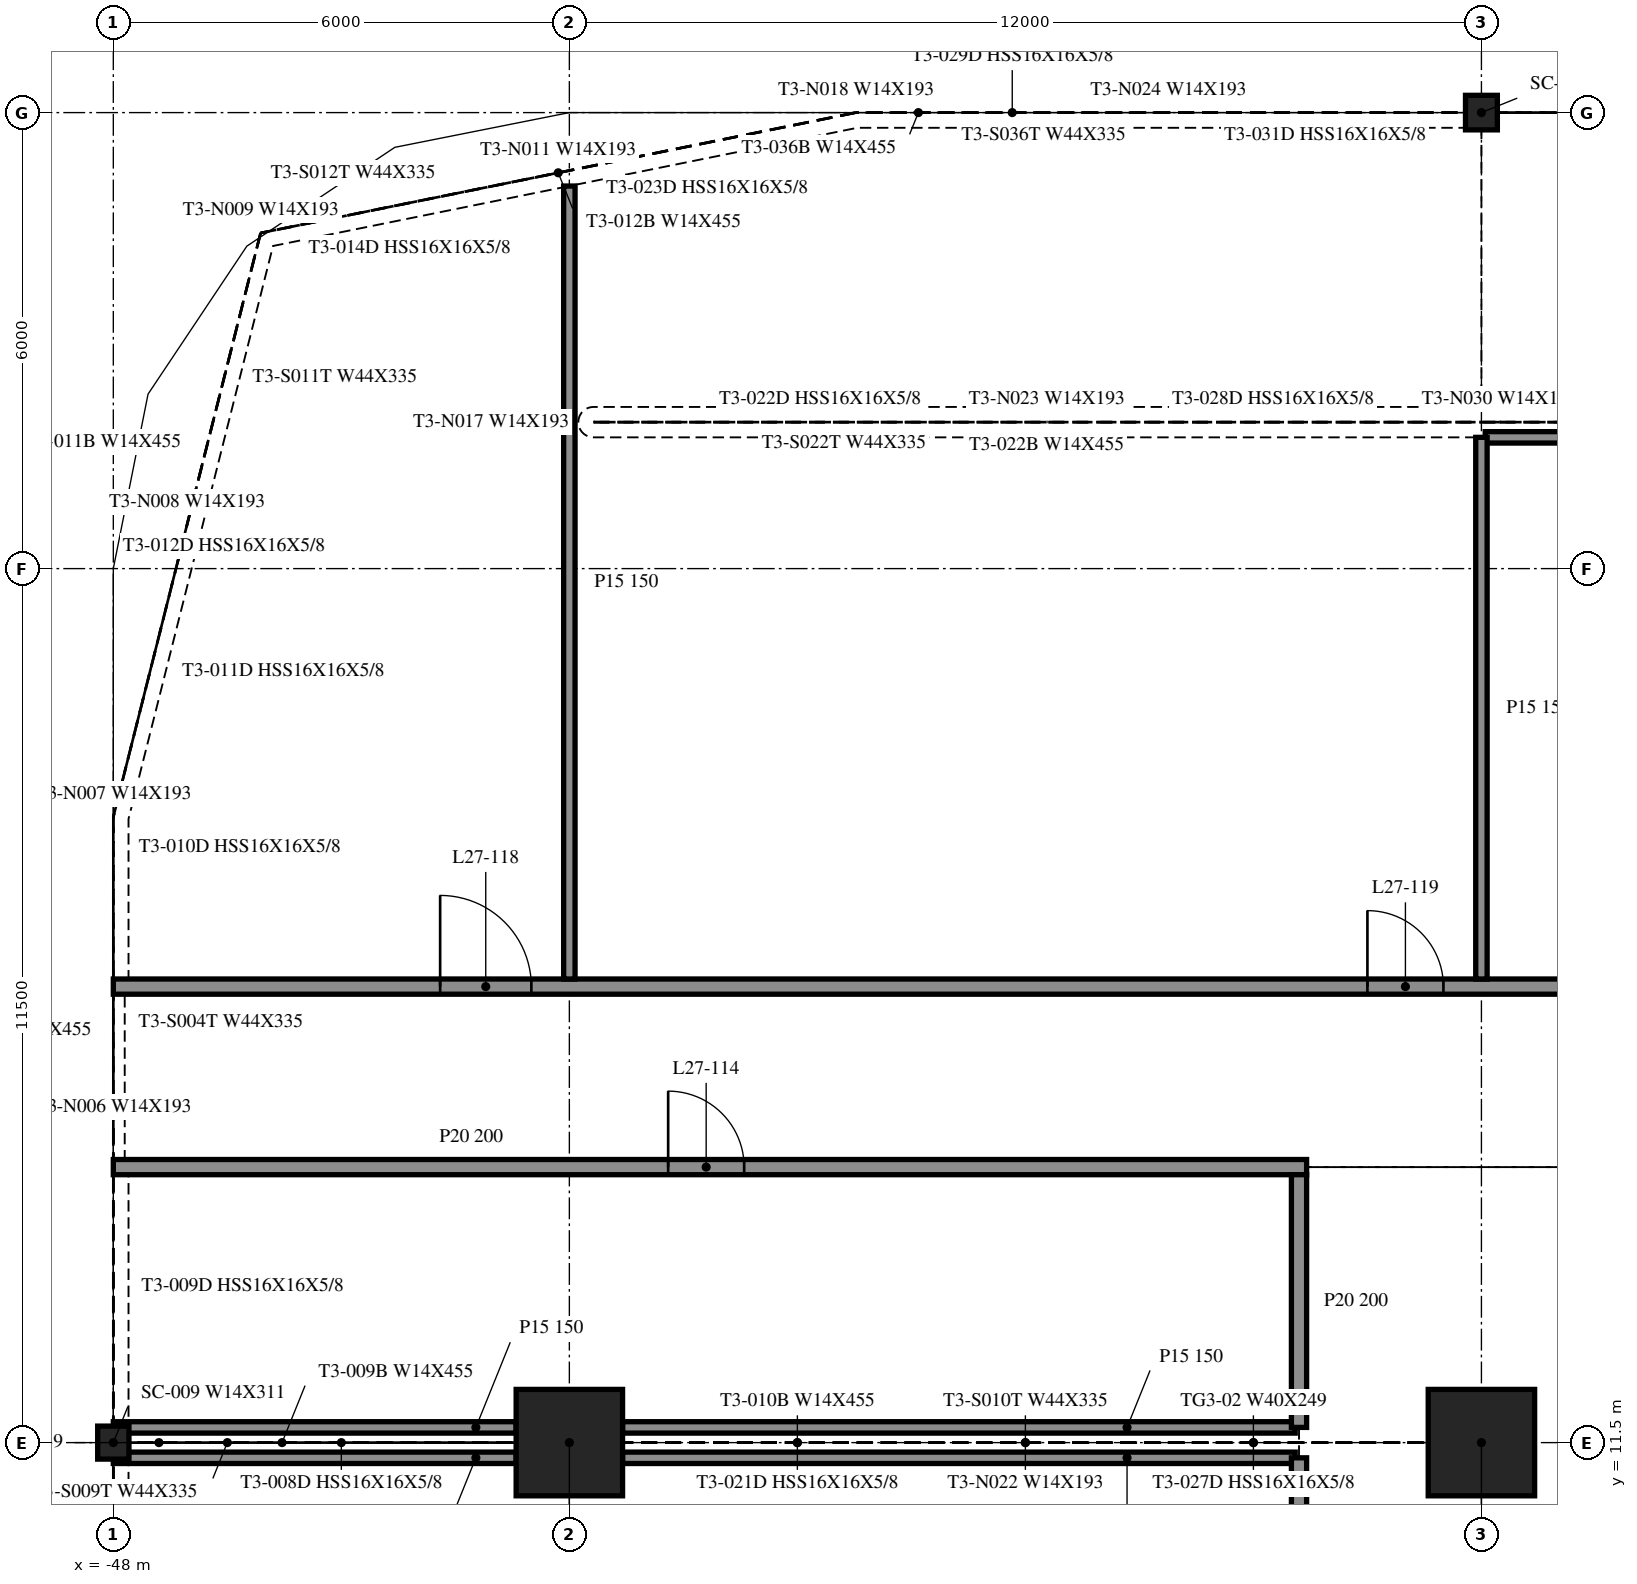
"""IFC4 building model, lengths in metres.
Left out: names, types, materials, properties, quantities, classifications, styles, units other than length and angle.
Written with IfcOpenShell. Run it as: python <this file> out.ifc"""

import sys

from ifc_helpers import new_model, si_unit, direction, frame, frame_2d, origin, origin_2d, place, context, subcontext, project, spatial, rectangle, i_section, extrude, element, fill, save


model = new_model("IFC4")
c1 = context("Model", 3, precision=1e-05, world=origin(), true_north=direction((0.0, 1.0)))
c2 = subcontext(c1, "Body", "Model", "MODEL_VIEW")
j1 = project(units=[si_unit("LENGTHUNIT", "METRE"), si_unit("PLANEANGLEUNIT", "RADIAN")], contexts=[c1])
p1 = place(None, origin())
s1 = spatial("IfcSite", under=j1, at=p1, CompositionType="ELEMENT")
p2 = place(p1, origin())
s2 = spatial("IfcBuilding", under=s1, at=p2, CompositionType="ELEMENT")
p3 = place(p2, frame((0.0, 0.0, 117.6)))
s3 = spatial("IfcBuildingStorey", under=s2, at=p3, CompositionType="ELEMENT", Elevation=117.6)
for number, where, z_axis, x_axis in (
    (1, (-42.0, 11.5, -0.55), (0.0, 0.0, 1.0), (1.0, 0.0, 0.0)),
    (2, (-30.0, 11.5, -0.55), (0.0, 0.0, 1.0), (1.0, 0.0, 0.0)),
):
    element("IfcColumn", number, at=place(p3, frame(where, z_axis=z_axis, x_axis=x_axis)), inside=s3, PredefinedType="COLUMN", context=c2, shape_type="SweptSolid", body=[
        extrude(rectangle(XDim=1.4, YDim=1.4, at=origin_2d()), origin(), (0.0, 0.0, 1.0), 4.61),
    ])
p4 = place(p3, frame((-30.0, 29.0, -0.55), z_axis=(0.0, 0.0, 1.0), x_axis=(1.0, 0.0, 0.0)))
e3 = element("IfcColumn", 3, at=p4, inside=s3, PredefinedType="COLUMN", context=c2, shape_type="SweptSolid", body=[
    extrude(i_section(OverallWidth=0.419, OverallDepth=0.455, WebThickness=0.042, FlangeThickness=0.068, at=origin_2d()), origin(), (0.0, 0.0, 1.0), 4.61),
])
p5 = place(p3, frame((-48.0, 11.5, -0.55), z_axis=(0.0, 0.0, 1.0), x_axis=(1.0, 0.0, 0.0)))
e4 = element("IfcColumn", 4, at=p5, inside=s3, PredefinedType="COLUMN", context=c2, shape_type="SweptSolid", body=[
    extrude(i_section(OverallWidth=0.412, OverallDepth=0.434, WebThickness=0.036, FlangeThickness=0.057, at=origin_2d()), origin(), (0.0, 0.0, 1.0), 4.61),
])
p6 = place(p3, frame((-48.0, 11.3, 0.0), z_axis=(0.0, 0.0, 1.0), x_axis=(1.0, 0.0, 0.0)))
e5 = element("IfcWall", 5, at=p6, inside=s3, PredefinedType="PARTITIONING", context=c2, shape_type="SweptSolid", body=[
    extrude(rectangle(XDim=5.3, YDim=0.15, at=frame_2d((2.65, 0.0))), origin(), (0.0, 0.0, 1.0), 4.06),
])
p7 = place(p3, frame((-41.3, 11.3, 0.0), z_axis=(0.0, 0.0, 1.0), x_axis=(1.0, 0.0, 0.0)))
e6 = element("IfcWall", 6, at=p7, inside=s3, PredefinedType="PARTITIONING", context=c2, shape_type="SweptSolid", body=[
    extrude(rectangle(XDim=8.85, YDim=0.15, at=frame_2d((4.425, 0.0))), origin(), (0.0, 0.0, 1.0), 4.06),
])
p8 = place(p3, frame((-48.0, 11.7, 0.0), z_axis=(0.0, 0.0, 1.0), x_axis=(1.0, 0.0, 0.0)))
e7 = element("IfcWall", 7, at=p8, inside=s3, PredefinedType="PARTITIONING", context=c2, shape_type="SweptSolid", body=[
    extrude(rectangle(XDim=5.3, YDim=0.15, at=frame_2d((2.65, 0.0))), origin(), (0.0, 0.0, 1.0), 4.06),
])
p9 = place(p3, frame((-41.3, 11.7, 0.0), z_axis=(0.0, 0.0, 1.0), x_axis=(1.0, 0.0, 0.0)))
e8 = element("IfcWall", 8, at=p9, inside=s3, PredefinedType="PARTITIONING", context=c2, shape_type="SweptSolid", body=[
    extrude(rectangle(XDim=8.85, YDim=0.15, at=frame_2d((4.425, 0.0))), origin(), (0.0, 0.0, 1.0), 4.06),
])
p10 = place(p3, frame((-48.0, 15.125, 0.0), z_axis=(0.0, 0.0, 1.0), x_axis=(1.0, 0.0, 0.0)))
e9 = element("IfcWall", 9, at=p10, inside=s3, PredefinedType="PARTITIONING", context=c2, shape_type="SweptSolid", body=[
    extrude(rectangle(XDim=15.7, YDim=0.2, at=frame_2d((7.85, 0.0))), origin(), (0.0, 0.0, 1.0), 4.06),
])
p11 = place(p10, frame((7.3, 0.0, 0.0)))
e10 = element("IfcOpeningElement", 10, at=p11, cuts=e9, PredefinedType="OPENING", context=c2, shape_type="SweptSolid", body=[
    extrude(rectangle(XDim=1.0, YDim=2.1, at=frame_2d((0.5, 1.05))), frame((0.0, 0.11, 0.0), z_axis=(0.0, -1.0, 0.0), x_axis=(1.0, 0.0, 0.0)), (0.0, 0.0, 1.0), 0.22),
])
p12 = place(p3, frame((-48.0, 17.5, 0.0), z_axis=(0.0, 0.0, 1.0), x_axis=(1.0, 0.0, 0.0)))
e11 = element("IfcWall", 11, at=p12, inside=s3, PredefinedType="PARTITIONING", context=c2, shape_type="SweptSolid", body=[
    extrude(rectangle(XDim=95.8, YDim=0.2, at=frame_2d((47.9, 0.0))), origin(), (0.0, 0.0, 1.0), 4.06),
])
p13 = place(p12, frame((4.3, 0.0, 0.0)))
e12 = element("IfcOpeningElement", 12, at=p13, cuts=e11, PredefinedType="OPENING", context=c2, shape_type="SweptSolid", body=[
    extrude(rectangle(XDim=1.2, YDim=2.1, at=frame_2d((0.6, 1.05))), frame((0.0, 0.11, 0.0), z_axis=(0.0, -1.0, 0.0), x_axis=(1.0, 0.0, 0.0)), (0.0, 0.0, 1.0), 0.22),
])
p14 = place(p12, frame((16.5, 0.0, 0.0)))
e13 = element("IfcOpeningElement", 13, at=p14, cuts=e11, PredefinedType="OPENING", context=c2, shape_type="SweptSolid", body=[
    extrude(rectangle(XDim=1.0, YDim=2.1, at=frame_2d((0.5, 1.05))), frame((0.0, 0.11, 0.0), z_axis=(0.0, -1.0, 0.0), x_axis=(1.0, 0.0, 0.0)), (0.0, 0.0, 1.0), 0.22),
])
p15 = place(p12, frame((28.3, 0.0, 0.0)))
e14 = element("IfcOpeningElement", 14, at=p15, cuts=e11, PredefinedType="OPENING", context=c2, shape_type="SweptSolid", body=[
    extrude(rectangle(XDim=1.2, YDim=2.1, at=frame_2d((0.6, 1.05))), frame((0.0, 0.11, 0.0), z_axis=(0.0, -1.0, 0.0), x_axis=(1.0, 0.0, 0.0)), (0.0, 0.0, 1.0), 0.22),
])
p16 = place(p12, frame((40.3, 0.0, 0.0)))
e15 = element("IfcOpeningElement", 15, at=p16, cuts=e11, PredefinedType="OPENING", context=c2, shape_type="SweptSolid", body=[
    extrude(rectangle(XDim=1.2, YDim=2.1, at=frame_2d((0.6, 1.05))), frame((0.0, 0.11, 0.0), z_axis=(0.0, -1.0, 0.0), x_axis=(1.0, 0.0, 0.0)), (0.0, 0.0, 1.0), 0.22),
])
p17 = place(p12, frame((47.3, 0.0, 0.0)))
e16 = element("IfcOpeningElement", 16, at=p17, cuts=e11, PredefinedType="OPENING", context=c2, shape_type="SweptSolid", body=[
    extrude(rectangle(XDim=1.0, YDim=2.1, at=frame_2d((0.5, 1.05))), frame((0.0, 0.11, 0.0), z_axis=(0.0, -1.0, 0.0), x_axis=(1.0, 0.0, 0.0)), (0.0, 0.0, 1.0), 0.22),
])
p18 = place(p12, frame((54.1, 0.0, 0.0)))
e17 = element("IfcOpeningElement", 17, at=p18, cuts=e11, PredefinedType="OPENING", context=c2, shape_type="SweptSolid", body=[
    extrude(rectangle(XDim=1.0, YDim=2.1, at=frame_2d((0.5, 1.05))), frame((0.0, 0.11, 0.0), z_axis=(0.0, -1.0, 0.0), x_axis=(1.0, 0.0, 0.0)), (0.0, 0.0, 1.0), 0.22),
])
p19 = place(p12, frame((66.1, 0.0, 0.0)))
e18 = element("IfcOpeningElement", 18, at=p19, cuts=e11, PredefinedType="OPENING", context=c2, shape_type="SweptSolid", body=[
    extrude(rectangle(XDim=1.2, YDim=2.1, at=frame_2d((0.6, 1.05))), frame((0.0, 0.11, 0.0), z_axis=(0.0, -1.0, 0.0), x_axis=(1.0, 0.0, 0.0)), (0.0, 0.0, 1.0), 0.22),
])
p20 = place(p12, frame((78.1, 0.0, 0.0)))
e19 = element("IfcOpeningElement", 19, at=p20, cuts=e11, PredefinedType="OPENING", context=c2, shape_type="SweptSolid", body=[
    extrude(rectangle(XDim=1.0, YDim=2.1, at=frame_2d((0.5, 1.05))), frame((0.0, 0.11, 0.0), z_axis=(0.0, -1.0, 0.0), x_axis=(1.0, 0.0, 0.0)), (0.0, 0.0, 1.0), 0.22),
])
p21 = place(p12, frame((90.1, 0.0, 0.0)))
e20 = element("IfcOpeningElement", 20, at=p21, cuts=e11, PredefinedType="OPENING", context=c2, shape_type="SweptSolid", body=[
    extrude(rectangle(XDim=1.2, YDim=2.1, at=frame_2d((0.6, 1.05))), frame((0.0, 0.11, 0.0), z_axis=(0.0, -1.0, 0.0), x_axis=(1.0, 0.0, 0.0)), (0.0, 0.0, 1.0), 0.22),
])
p22 = place(p3, frame((-29.95, 24.727, 0.0), z_axis=(0.0, 0.0, 1.0), x_axis=(1.0, 0.0, 0.0)))
e21 = element("IfcWall", 21, at=p22, inside=s3, PredefinedType="PARTITIONING", context=c2, shape_type="SweptSolid", body=[
    extrude(rectangle(XDim=11.9, YDim=0.15, at=frame_2d((5.95, 0.0))), origin(), (0.0, 0.0, 1.0), 4.06),
])
p23 = place(p3, frame((-42.0, 17.6, 0.0), z_axis=(0.0, 0.0, 1.0), x_axis=(0.0, 1.0, 0.0)))
e22 = element("IfcWall", 22, at=p23, inside=s3, PredefinedType="PARTITIONING", context=c2, shape_type="SweptSolid", body=[
    extrude(rectangle(XDim=10.434, YDim=0.15, at=frame_2d((5.217, 0.0))), origin(), (0.0, 0.0, 1.0), 4.06),
])
p24 = place(p3, frame((-32.4, 0.2, 0.0), z_axis=(0.0, 0.0, 1.0), x_axis=(0.0, 1.0, 0.0)))
e23 = element("IfcWall", 23, at=p24, inside=s3, PredefinedType="PARTITIONING", context=c2, shape_type="SweptSolid", body=[
    extrude(rectangle(XDim=11.1, YDim=0.2, at=frame_2d((5.55, 0.0))), origin(), (0.0, 0.0, 1.0), 4.06),
])
p25 = place(p24, frame((4.9, 0.0, 0.0)))
e24 = element("IfcOpeningElement", 24, at=p25, cuts=e23, PredefinedType="OPENING", context=c2, shape_type="SweptSolid", body=[
    extrude(rectangle(XDim=1.2, YDim=2.1, at=frame_2d((0.6, 1.05))), frame((0.0, 0.11, 0.0), z_axis=(0.0, -1.0, 0.0), x_axis=(1.0, 0.0, 0.0)), (0.0, 0.0, 1.0), 0.22),
])
p26 = place(p3, frame((-32.4, 11.7, 0.0), z_axis=(0.0, 0.0, 1.0), x_axis=(0.0, 1.0, 0.0)))
e25 = element("IfcWall", 25, at=p26, inside=s3, PredefinedType="PARTITIONING", context=c2, shape_type="SweptSolid", body=[
    extrude(rectangle(XDim=3.325, YDim=0.2, at=frame_2d((1.663, 0.0))), origin(), (0.0, 0.0, 1.0), 4.06),
])
p27 = place(p3, frame((-30.0, 17.6, 0.0), z_axis=(0.0, 0.0, 1.0), x_axis=(0.0, 1.0, 0.0)))
e26 = element("IfcWall", 26, at=p27, inside=s3, PredefinedType="PARTITIONING", context=c2, shape_type="SweptSolid", body=[
    extrude(rectangle(XDim=7.127, YDim=0.15, at=frame_2d((3.563, 0.0))), origin(), (0.0, 0.0, 1.0), 4.06),
])
p28 = place(p11, origin())
e27 = element("IfcDoor", 27, at=p28, inside=s3, OperationType="SINGLE_SWING_LEFT", PredefinedType="DOOR", context=c2, shape_type="SweptSolid", body=[
    extrude(rectangle(XDim=1.0, YDim=2.1, at=frame_2d((0.5, 1.05))), frame((0.0, 0.025, 0.0), z_axis=(0.0, -1.0, 0.0), x_axis=(1.0, 0.0, 0.0)), (0.0, 0.0, 1.0), 0.05),
])
fill(e10, e27)
p29 = place(p13, origin())
e28 = element("IfcDoor", 28, at=p29, inside=s3, OperationType="SINGLE_SWING_LEFT", PredefinedType="DOOR", context=c2, shape_type="SweptSolid", body=[
    extrude(rectangle(XDim=1.2, YDim=2.1, at=frame_2d((0.6, 1.05))), frame((0.0, 0.025, 0.0), z_axis=(0.0, -1.0, 0.0), x_axis=(1.0, 0.0, 0.0)), (0.0, 0.0, 1.0), 0.05),
])
fill(e12, e28)
p30 = place(p14, origin())
e29 = element("IfcDoor", 29, at=p30, inside=s3, OperationType="SINGLE_SWING_LEFT", PredefinedType="DOOR", context=c2, shape_type="SweptSolid", body=[
    extrude(rectangle(XDim=1.0, YDim=2.1, at=frame_2d((0.5, 1.05))), frame((0.0, 0.025, 0.0), z_axis=(0.0, -1.0, 0.0), x_axis=(1.0, 0.0, 0.0)), (0.0, 0.0, 1.0), 0.05),
])
fill(e13, e29)
save(model, sys.argv[1])
